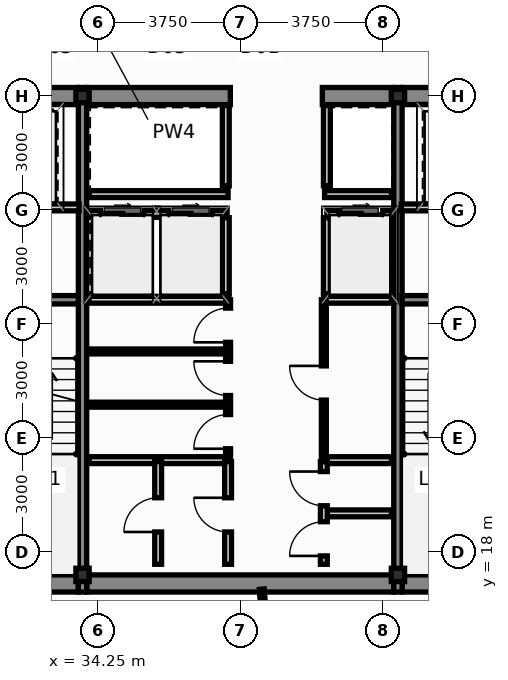
"""IFC4 building model, lengths in metres.
Left out: names, types, materials, properties, quantities, classifications, styles, units other than length and angle.
Written with IfcOpenShell. Run it as: python <this file> out.ifc"""

import sys

from ifc_helpers import new_model, si_unit, direction, frame, frame_2d, origin, origin_2d, place, context, subcontext, project, spatial, rectangle, hollow_rectangle, extrude, source, transform, mapped, element, fill, save


model = new_model("IFC4")
c1 = context("Model", 3, precision=1e-05, world=origin(), true_north=direction((0.0, 1.0)))
c2 = subcontext(c1, "Body", "Model", "MODEL_VIEW")
j1 = project(units=[si_unit("LENGTHUNIT", "METRE"), si_unit("PLANEANGLEUNIT", "RADIAN")], contexts=[c1])
p1 = place(None, origin())
s1 = spatial("IfcSite", under=j1, at=p1, CompositionType="ELEMENT")
p2 = place(p1, origin())
s2 = spatial("IfcBuilding", under=s1, at=p2, CompositionType="ELEMENT")
p3 = place(p2, frame((0.0, 0.0, 209.6)))
s3 = spatial("IfcBuildingStorey", under=s2, at=p3, CompositionType="ELEMENT", Elevation=209.6)
m1 = source(origin(), c2, "Body", "SweptSolid", [
    extrude(hollow_rectangle(XDim=0.35, YDim=0.35, WallThickness=0.016, at=origin_2d()), origin(), (0.0, 0.0, 1.0), 3.65),
])
for number, where, z_axis, x_axis in (
    (1, (33.85, 17.4, 0.0), (0.0, 0.0, 1.0), (1.0, 0.0, 0.0)),
    (2, (42.15, 17.4, 0.0), (0.0, 0.0, 1.0), (1.0, 0.0, 0.0)),
    (3, (33.85, 30.0, 0.0), (0.0, 0.0, 1.0), (1.0, 0.0, 0.0)),
    (4, (42.15, 30.0, 0.0), (0.0, 0.0, 1.0), (1.0, 0.0, 0.0)),
):
    element("IfcColumn", number, at=place(p3, frame(where, z_axis=z_axis, x_axis=x_axis)), inside=s3, PredefinedType="COLUMN", context=c2, shape_type="MappedRepresentation", body=[
        mapped(m1, transform((0.0, 0.0, 0.0), scale=1.0)),
    ])
p4 = place(p3, frame((30.84, 17.175, 0.0), z_axis=(0.0, 0.0, 1.0), x_axis=(1.0, 0.0, 0.0)))
e5 = element("IfcWall", 5, at=p4, inside=s3, PredefinedType="SHEAR", context=c2, shape_type="SweptSolid", body=[
    extrude(rectangle(XDim=2.9, YDim=0.45, at=frame_2d((1.45, 0.0))), origin(), (0.0, 0.0, 1.0), 3.65),
])
p5 = place(p3, frame((33.96, 17.175, 0.0), z_axis=(0.0, 0.0, 1.0), x_axis=(1.0, 0.0, 0.0)))
e6 = element("IfcWall", 6, at=p5, inside=s3, PredefinedType="SHEAR", context=c2, shape_type="SweptSolid", body=[
    extrude(rectangle(XDim=8.08, YDim=0.45, at=frame_2d((4.04, 0.0))), origin(), (0.0, 0.0, 1.0), 3.65),
])
for number, where, z_axis, x_axis in (
    (7, (42.26, 17.175, 0.0), (0.0, 0.0, 1.0), (1.0, 0.0, 0.0)),
    (8, (30.84, 30.0, 0.0), (0.0, 0.0, 1.0), (1.0, 0.0, 0.0)),
):
    element("IfcWall", number, at=place(p3, frame(where, z_axis=z_axis, x_axis=x_axis)), inside=s3, PredefinedType="SHEAR", context=c2, shape_type="SweptSolid", body=[
        extrude(rectangle(XDim=2.9, YDim=0.45, at=frame_2d((1.45, 0.0))), origin(), (0.0, 0.0, 1.0), 3.65),
    ])
p6 = place(p3, frame((33.96, 30.0, 0.0), z_axis=(0.0, 0.0, 1.0), x_axis=(1.0, 0.0, 0.0)))
e9 = element("IfcWall", 9, at=p6, inside=s3, PredefinedType="SHEAR", context=c2, shape_type="SweptSolid", body=[
    extrude(rectangle(XDim=3.78, YDim=0.45, at=frame_2d((1.89, 0.0))), origin(), (0.0, 0.0, 1.0), 3.65),
])
p7 = place(p3, frame((40.16, 30.0, 0.0), z_axis=(0.0, 0.0, 1.0), x_axis=(1.0, 0.0, 0.0)))
e10 = element("IfcWall", 10, at=p7, inside=s3, PredefinedType="SHEAR", context=c2, shape_type="SweptSolid", body=[
    extrude(rectangle(XDim=1.88, YDim=0.45, at=frame_2d((0.94, 0.0))), origin(), (0.0, 0.0, 1.0), 3.65),
])
p8 = place(p3, frame((42.26, 30.0, 0.0), z_axis=(0.0, 0.0, 1.0), x_axis=(1.0, 0.0, 0.0)))
e11 = element("IfcWall", 11, at=p8, inside=s3, PredefinedType="SHEAR", context=c2, shape_type="SweptSolid", body=[
    extrude(rectangle(XDim=2.9, YDim=0.45, at=frame_2d((1.45, 0.0))), origin(), (0.0, 0.0, 1.0), 3.65),
])
for number, where, z_axis, x_axis in (
    (12, (33.85, 16.95, 0.0), (0.0, 0.0, 1.0), (0.0, 1.0, 0.0)),
    (13, (42.15, 16.95, 0.0), (0.0, 0.0, 1.0), (0.0, 1.0, 0.0)),
):
    element("IfcWall", number, at=place(p3, frame(where, z_axis=z_axis, x_axis=x_axis)), inside=s3, PredefinedType="SHEAR", context=c2, shape_type="SweptSolid", body=[
        extrude(rectangle(XDim=13.275, YDim=0.22, at=frame_2d((6.638, 0.0))), origin(), (0.0, 0.0, 1.0), 3.65),
    ])
for number, where, z_axis, x_axis in (
    (14, (30.84, 24.64, 0.0), (0.0, 0.0, 1.0), (1.0, 0.0, 0.0)),
    (15, (42.26, 24.64, 0.0), (0.0, 0.0, 1.0), (1.0, 0.0, 0.0)),
):
    element("IfcWall", number, at=place(p3, frame(where, z_axis=z_axis, x_axis=x_axis)), inside=s3, PredefinedType="SHEAR", context=c2, shape_type="SweptSolid", body=[
        extrude(rectangle(XDim=2.9, YDim=0.22, at=frame_2d((1.45, 0.0))), origin(), (0.0, 0.0, 1.0), 3.65),
    ])
p9 = place(p3, frame((34.02, 26.9, 0.0), z_axis=(0.0, 0.0, 1.0), x_axis=(1.0, 0.0, 0.0)))
e16 = element("IfcWall", 16, at=p9, inside=s3, PredefinedType="PARTITIONING", context=c2, shape_type="SweptSolid", body=[
    extrude(rectangle(XDim=3.6, YDim=0.18, at=frame_2d((1.8, 0.0))), origin(), (0.0, 0.0, 1.0), 3.4),
])
p10 = place(p9, frame((0.3, 0.0, 0.0)))
e17 = element("IfcOpeningElement", 17, at=p10, cuts=e16, PredefinedType="OPENING", context=c2, shape_type="SweptSolid", body=[
    extrude(rectangle(XDim=1.15, YDim=2.2, at=frame_2d((0.575, 1.1))), frame((0.0, 0.102, 0.0), z_axis=(0.0, -1.0, 0.0), x_axis=(1.0, 0.0, 0.0)), (0.0, 0.0, 1.0), 0.204),
])
p11 = place(p9, frame((2.1, 0.0, 0.0)))
e18 = element("IfcOpeningElement", 18, at=p11, cuts=e16, PredefinedType="OPENING", context=c2, shape_type="SweptSolid", body=[
    extrude(rectangle(XDim=1.15, YDim=2.2, at=frame_2d((0.575, 1.1))), frame((0.0, 0.102, 0.0), z_axis=(0.0, -1.0, 0.0), x_axis=(1.0, 0.0, 0.0)), (0.0, 0.0, 1.0), 0.204),
])
p12 = place(p3, frame((40.28, 26.9, 0.0), z_axis=(0.0, 0.0, 1.0), x_axis=(1.0, 0.0, 0.0)))
e19 = element("IfcWall", 19, at=p12, inside=s3, PredefinedType="PARTITIONING", context=c2, shape_type="SweptSolid", body=[
    extrude(rectangle(XDim=1.7, YDim=0.18, at=frame_2d((0.85, 0.0))), origin(), (0.0, 0.0, 1.0), 3.4),
])
p13 = place(p12, frame((0.32, 0.0, 0.0)))
e20 = element("IfcOpeningElement", 20, at=p13, cuts=e19, PredefinedType="OPENING", context=c2, shape_type="SweptSolid", body=[
    extrude(rectangle(XDim=1.15, YDim=2.2, at=frame_2d((0.575, 1.1))), frame((0.0, 0.102, 0.0), z_axis=(0.0, -1.0, 0.0), x_axis=(1.0, 0.0, 0.0)), (0.0, 0.0, 1.0), 0.204),
])
for number, where, z_axis, x_axis in (
    (21, (37.62, 24.8, 0.0), (0.0, 0.0, 1.0), (0.0, 1.0, 0.0)),
    (22, (40.28, 24.8, 0.0), (0.0, 0.0, 1.0), (0.0, 1.0, 0.0)),
):
    element("IfcWall", number, at=place(p3, frame(where, z_axis=z_axis, x_axis=x_axis)), inside=s3, PredefinedType="PARTITIONING", context=c2, shape_type="SweptSolid", body=[
        extrude(rectangle(XDim=2.0, YDim=0.18, at=frame_2d((1.0, 0.0))), origin(), (0.0, 0.0, 1.0), 3.4),
    ])
p14 = place(p3, frame((34.02, 24.64, 0.0), z_axis=(0.0, 0.0, 1.0), x_axis=(1.0, 0.0, 0.0)))
e23 = element("IfcWall", 23, at=p14, inside=s3, PredefinedType="PARTITIONING", context=c2, shape_type="SweptSolid", body=[
    extrude(rectangle(XDim=3.68, YDim=0.18, at=frame_2d((1.84, 0.0))), origin(), (0.0, 0.0, 1.0), 3.4),
])
p15 = place(p3, frame((40.2, 24.64, 0.0), z_axis=(0.0, 0.0, 1.0), x_axis=(1.0, 0.0, 0.0)))
e24 = element("IfcWall", 24, at=p15, inside=s3, PredefinedType="PARTITIONING", context=c2, shape_type="SweptSolid", body=[
    extrude(rectangle(XDim=1.78, YDim=0.18, at=frame_2d((0.89, 0.0))), origin(), (0.0, 0.0, 1.0), 3.4),
])
p16 = place(p3, frame((34.02, 27.42, 0.0), z_axis=(0.0, 0.0, 1.0), x_axis=(1.0, 0.0, 0.0)))
e25 = element("IfcWall", 25, at=p16, inside=s3, PredefinedType="PARTITIONING", context=c2, shape_type="SweptSolid", body=[
    extrude(rectangle(XDim=3.66, YDim=0.18, at=frame_2d((1.83, 0.0))), origin(), (0.0, 0.0, 1.0), 3.4),
])
p17 = place(p3, frame((40.22, 27.42, 0.0), z_axis=(0.0, 0.0, 1.0), x_axis=(1.0, 0.0, 0.0)))
e26 = element("IfcWall", 26, at=p17, inside=s3, PredefinedType="PARTITIONING", context=c2, shape_type="SweptSolid", body=[
    extrude(rectangle(XDim=1.76, YDim=0.18, at=frame_2d((0.88, 0.0))), origin(), (0.0, 0.0, 1.0), 3.4),
])
for number, where, z_axis, x_axis in (
    (27, (37.62, 27.64, 0.0), (0.0, 0.0, 1.0), (0.0, 1.0, 0.0)),
    (28, (40.28, 27.64, 0.0), (0.0, 0.0, 1.0), (0.0, 1.0, 0.0)),
):
    element("IfcWall", number, at=place(p3, frame(where, z_axis=z_axis, x_axis=x_axis)), inside=s3, PredefinedType="PARTITIONING", context=c2, shape_type="SweptSolid", body=[
        extrude(rectangle(XDim=2.11, YDim=0.18, at=frame_2d((1.055, 0.0))), origin(), (0.0, 0.0, 1.0), 3.4),
    ])
for number, where, z_axis, x_axis in (
    (29, (30.86, 27.07, 0.0), (0.0, 0.0, 1.0), (1.0, 0.0, 0.0)),
    (30, (42.24, 27.07, 0.0), (0.0, 0.0, 1.0), (1.0, 0.0, 0.0)),
):
    element("IfcWall", number, at=place(p3, frame(where, z_axis=z_axis, x_axis=x_axis)), inside=s3, PredefinedType="PARTITIONING", context=c2, shape_type="SweptSolid", body=[
        extrude(rectangle(XDim=2.9, YDim=0.18, at=frame_2d((1.45, 0.0))), origin(), (0.0, 0.0, 1.0), 3.4),
    ])
p18 = place(p3, frame((34.02, 20.42, 0.0), z_axis=(0.0, 0.0, 1.0), x_axis=(1.0, 0.0, 0.0)))
e31 = element("IfcWall", 31, at=p18, inside=s3, PredefinedType="PARTITIONING", context=c2, shape_type="SweptSolid", body=[
    extrude(rectangle(XDim=3.64, YDim=0.18, at=frame_2d((1.82, 0.0))), origin(), (0.0, 0.0, 1.0), 3.4),
])
p19 = place(p3, frame((40.22, 20.42, 0.0), z_axis=(0.0, 0.0, 1.0), x_axis=(1.0, 0.0, 0.0)))
e32 = element("IfcWall", 32, at=p19, inside=s3, PredefinedType="PARTITIONING", context=c2, shape_type="SweptSolid", body=[
    extrude(rectangle(XDim=1.76, YDim=0.18, at=frame_2d((0.88, 0.0))), origin(), (0.0, 0.0, 1.0), 3.4),
])
for number, where, z_axis, x_axis in (
    (33, (34.02, 21.88, 0.0), (0.0, 0.0, 1.0), (1.0, 0.0, 0.0)),
    (34, (34.02, 23.28, 0.0), (0.0, 0.0, 1.0), (1.0, 0.0, 0.0)),
):
    element("IfcWall", number, at=place(p3, frame(where, z_axis=z_axis, x_axis=x_axis)), inside=s3, PredefinedType="PARTITIONING", context=c2, shape_type="SweptSolid", body=[
        extrude(rectangle(XDim=3.58, YDim=0.13, at=frame_2d((1.79, 0.0))), origin(), (0.0, 0.0, 1.0), 3.4),
    ])
p20 = place(p3, frame((37.68, 20.5, 0.0), z_axis=(0.0, 0.0, 1.0), x_axis=(0.0, 1.0, 0.0)))
e35 = element("IfcWall", 35, at=p20, inside=s3, PredefinedType="PARTITIONING", context=c2, shape_type="SweptSolid", body=[
    extrude(rectangle(XDim=4.14, YDim=0.13, at=frame_2d((2.07, 0.0))), origin(), (0.0, 0.0, 1.0), 3.4),
])
p21 = place(p20, frame((0.22, 0.0, 0.0)))
e36 = element("IfcOpeningElement", 36, at=p21, cuts=e35, PredefinedType="OPENING", context=c2, shape_type="SweptSolid", body=[
    extrude(rectangle(XDim=0.9, YDim=2.1, at=frame_2d((0.45, 1.05))), frame((0.0, 0.077, 0.0), z_axis=(0.0, -1.0, 0.0), x_axis=(1.0, 0.0, 0.0)), (0.0, 0.0, 1.0), 0.154),
])
p22 = place(p20, frame((1.62, 0.0, 0.0)))
e37 = element("IfcOpeningElement", 37, at=p22, cuts=e35, PredefinedType="OPENING", context=c2, shape_type="SweptSolid", body=[
    extrude(rectangle(XDim=0.9, YDim=2.1, at=frame_2d((0.45, 1.05))), frame((0.0, 0.077, 0.0), z_axis=(0.0, -1.0, 0.0), x_axis=(1.0, 0.0, 0.0)), (0.0, 0.0, 1.0), 0.154),
])
p23 = place(p20, frame((3.02, 0.0, 0.0)))
e38 = element("IfcOpeningElement", 38, at=p23, cuts=e35, PredefinedType="OPENING", context=c2, shape_type="SweptSolid", body=[
    extrude(rectangle(XDim=0.9, YDim=2.1, at=frame_2d((0.45, 1.05))), frame((0.0, 0.077, 0.0), z_axis=(0.0, -1.0, 0.0), x_axis=(1.0, 0.0, 0.0)), (0.0, 0.0, 1.0), 0.154),
])
p24 = place(p3, frame((40.2, 20.5, 0.0), z_axis=(0.0, 0.0, 1.0), x_axis=(0.0, 1.0, 0.0)))
e39 = element("IfcWall", 39, at=p24, inside=s3, PredefinedType="PARTITIONING", context=c2, shape_type="SweptSolid", body=[
    extrude(rectangle(XDim=4.14, YDim=0.13, at=frame_2d((2.07, 0.0))), origin(), (0.0, 0.0, 1.0), 3.4),
])
p25 = place(p24, frame((1.5, 0.0, 0.0)))
e40 = element("IfcOpeningElement", 40, at=p25, cuts=e39, PredefinedType="OPENING", context=c2, shape_type="SweptSolid", body=[
    extrude(rectangle(XDim=0.9, YDim=2.1, at=frame_2d((0.45, 1.05))), frame((0.0, 0.077, 0.0), z_axis=(0.0, -1.0, 0.0), x_axis=(1.0, 0.0, 0.0)), (0.0, 0.0, 1.0), 0.154),
])
p26 = place(p3, frame((35.84, 17.68, 0.0), z_axis=(0.0, 0.0, 1.0), x_axis=(0.0, 1.0, 0.0)))
e41 = element("IfcWall", 41, at=p26, inside=s3, PredefinedType="PARTITIONING", context=c2, shape_type="SweptSolid", body=[
    extrude(rectangle(XDim=2.7, YDim=0.18, at=frame_2d((1.35, 0.0))), origin(), (0.0, 0.0, 1.0), 3.4),
])
p27 = place(p26, frame((0.85, 0.0, 0.0)))
e42 = element("IfcOpeningElement", 42, at=p27, cuts=e41, PredefinedType="OPENING", context=c2, shape_type="SweptSolid", body=[
    extrude(rectangle(XDim=0.9, YDim=2.1, at=frame_2d((0.45, 1.05))), frame((0.0, 0.102, 0.0), z_axis=(0.0, -1.0, 0.0), x_axis=(1.0, 0.0, 0.0)), (0.0, 0.0, 1.0), 0.204),
])
p28 = place(p3, frame((37.68, 17.68, 0.0), z_axis=(0.0, 0.0, 1.0), x_axis=(0.0, 1.0, 0.0)))
e43 = element("IfcWall", 43, at=p28, inside=s3, PredefinedType="PARTITIONING", context=c2, shape_type="SweptSolid", body=[
    extrude(rectangle(XDim=2.7, YDim=0.18, at=frame_2d((1.35, 0.0))), origin(), (0.0, 0.0, 1.0), 3.4),
])
p29 = place(p28, frame((0.85, 0.0, 0.0)))
e44 = element("IfcOpeningElement", 44, at=p29, cuts=e43, PredefinedType="OPENING", context=c2, shape_type="SweptSolid", body=[
    extrude(rectangle(XDim=0.9, YDim=2.1, at=frame_2d((0.45, 1.05))), frame((0.0, 0.102, 0.0), z_axis=(0.0, -1.0, 0.0), x_axis=(1.0, 0.0, 0.0)), (0.0, 0.0, 1.0), 0.204),
])
p30 = place(p3, frame((40.28, 19.02, 0.0), z_axis=(0.0, 0.0, 1.0), x_axis=(1.0, 0.0, 0.0)))
e45 = element("IfcWall", 45, at=p30, inside=s3, PredefinedType="PARTITIONING", context=c2, shape_type="SweptSolid", body=[
    extrude(rectangle(XDim=1.7, YDim=0.18, at=frame_2d((0.85, 0.0))), origin(), (0.0, 0.0, 1.0), 3.4),
])
p31 = place(p3, frame((40.2, 17.68, 0.0), z_axis=(0.0, 0.0, 1.0), x_axis=(0.0, 1.0, 0.0)))
e46 = element("IfcWall", 46, at=p31, inside=s3, PredefinedType="PARTITIONING", context=c2, shape_type="SweptSolid", body=[
    extrude(rectangle(XDim=2.7, YDim=0.18, at=frame_2d((1.35, 0.0))), origin(), (0.0, 0.0, 1.0), 3.4),
])
p32 = place(p31, frame((0.22, 0.0, 0.0)))
e47 = element("IfcOpeningElement", 47, at=p32, cuts=e46, PredefinedType="OPENING", context=c2, shape_type="SweptSolid", body=[
    extrude(rectangle(XDim=0.9, YDim=2.1, at=frame_2d((0.45, 1.05))), frame((0.0, 0.102, 0.0), z_axis=(0.0, -1.0, 0.0), x_axis=(1.0, 0.0, 0.0)), (0.0, 0.0, 1.0), 0.204),
])
p33 = place(p31, frame((1.54, 0.0, 0.0)))
e48 = element("IfcOpeningElement", 48, at=p33, cuts=e46, PredefinedType="OPENING", context=c2, shape_type="SweptSolid", body=[
    extrude(rectangle(XDim=0.9, YDim=2.1, at=frame_2d((0.45, 1.05))), frame((0.0, 0.102, 0.0), z_axis=(0.0, -1.0, 0.0), x_axis=(1.0, 0.0, 0.0)), (0.0, 0.0, 1.0), 0.204),
])
p34 = place(p3, frame((38.566, 17.025, 0.0), z_axis=(0.0, 0.0, 1.0), x_axis=(0.079833930884, -0.996808177876, 0.0)))
e49 = element("IfcWall", 49, at=p34, inside=s3, PredefinedType="PARTITIONING", context=c2, shape_type="SweptSolid", body=[
    extrude(rectangle(XDim=5.688, YDim=0.13, at=frame_2d((2.844, 0.0))), origin(), (0.0, 0.0, 1.0), 3.4),
])
p35 = place(p10, origin())
e50 = element("IfcDoor", 50, at=p35, inside=s3, OperationType="SLIDING_TO_LEFT", PredefinedType="DOOR", context=c2, shape_type="SweptSolid", body=[
    extrude(rectangle(XDim=1.15, YDim=2.2, at=frame_2d((0.575, 1.1))), frame((0.0, 0.025, 0.0), z_axis=(0.0, -1.0, 0.0), x_axis=(1.0, 0.0, 0.0)), (0.0, 0.0, 1.0), 0.05),
])
fill(e17, e50)
p36 = place(p11, origin())
e51 = element("IfcDoor", 51, at=p36, inside=s3, OperationType="SLIDING_TO_RIGHT", PredefinedType="DOOR", context=c2, shape_type="SweptSolid", body=[
    extrude(rectangle(XDim=1.15, YDim=2.2, at=frame_2d((0.575, 1.1))), frame((0.0, 0.025, 0.0), z_axis=(0.0, -1.0, 0.0), x_axis=(1.0, 0.0, 0.0)), (0.0, 0.0, 1.0), 0.05),
])
fill(e18, e51)
p37 = place(p13, origin())
e52 = element("IfcDoor", 52, at=p37, inside=s3, OperationType="SLIDING_TO_LEFT", PredefinedType="DOOR", context=c2, shape_type="SweptSolid", body=[
    extrude(rectangle(XDim=1.15, YDim=2.2, at=frame_2d((0.575, 1.1))), frame((0.0, 0.025, 0.0), z_axis=(0.0, -1.0, 0.0), x_axis=(1.0, 0.0, 0.0)), (0.0, 0.0, 1.0), 0.05),
])
fill(e20, e52)
p38 = place(p21, origin())
e53 = element("IfcDoor", 53, at=p38, inside=s3, OperationType="SINGLE_SWING_LEFT", PredefinedType="DOOR", context=c2, shape_type="SweptSolid", body=[
    extrude(rectangle(XDim=0.9, YDim=2.1, at=frame_2d((0.45, 1.05))), frame((0.0, 0.025, 0.0), z_axis=(0.0, -1.0, 0.0), x_axis=(1.0, 0.0, 0.0)), (0.0, 0.0, 1.0), 0.05),
])
fill(e36, e53)
p39 = place(p22, origin())
e54 = element("IfcDoor", 54, at=p39, inside=s3, OperationType="SINGLE_SWING_RIGHT", PredefinedType="DOOR", context=c2, shape_type="SweptSolid", body=[
    extrude(rectangle(XDim=0.9, YDim=2.1, at=frame_2d((0.45, 1.05))), frame((0.0, 0.025, 0.0), z_axis=(0.0, -1.0, 0.0), x_axis=(1.0, 0.0, 0.0)), (0.0, 0.0, 1.0), 0.05),
])
fill(e37, e54)
p40 = place(p23, origin())
e55 = element("IfcDoor", 55, at=p40, inside=s3, OperationType="SINGLE_SWING_LEFT", PredefinedType="DOOR", context=c2, shape_type="SweptSolid", body=[
    extrude(rectangle(XDim=0.9, YDim=2.1, at=frame_2d((0.45, 1.05))), frame((0.0, 0.025, 0.0), z_axis=(0.0, -1.0, 0.0), x_axis=(1.0, 0.0, 0.0)), (0.0, 0.0, 1.0), 0.05),
])
fill(e38, e55)
p41 = place(p25, origin())
e56 = element("IfcDoor", 56, at=p41, inside=s3, OperationType="SINGLE_SWING_RIGHT", PredefinedType="DOOR", context=c2, shape_type="SweptSolid", body=[
    extrude(rectangle(XDim=0.9, YDim=2.1, at=frame_2d((0.45, 1.05))), frame((0.0, 0.025, 0.0), z_axis=(0.0, -1.0, 0.0), x_axis=(1.0, 0.0, 0.0)), (0.0, 0.0, 1.0), 0.05),
])
fill(e40, e56)
p42 = place(p27, origin())
e57 = element("IfcDoor", 57, at=p42, inside=s3, OperationType="SINGLE_SWING_LEFT", PredefinedType="DOOR", context=c2, shape_type="SweptSolid", body=[
    extrude(rectangle(XDim=0.9, YDim=2.1, at=frame_2d((0.45, 1.05))), frame((0.0, 0.025, 0.0), z_axis=(0.0, -1.0, 0.0), x_axis=(1.0, 0.0, 0.0)), (0.0, 0.0, 1.0), 0.05),
])
fill(e42, e57)
p43 = place(p29, origin())
e58 = element("IfcDoor", 58, at=p43, inside=s3, OperationType="SINGLE_SWING_RIGHT", PredefinedType="DOOR", context=c2, shape_type="SweptSolid", body=[
    extrude(rectangle(XDim=0.9, YDim=2.1, at=frame_2d((0.45, 1.05))), frame((0.0, 0.025, 0.0), z_axis=(0.0, -1.0, 0.0), x_axis=(1.0, 0.0, 0.0)), (0.0, 0.0, 1.0), 0.05),
])
fill(e44, e58)
p44 = place(p32, origin())
e59 = element("IfcDoor", 59, at=p44, inside=s3, OperationType="SINGLE_SWING_LEFT", PredefinedType="DOOR", context=c2, shape_type="SweptSolid", body=[
    extrude(rectangle(XDim=0.9, YDim=2.1, at=frame_2d((0.45, 1.05))), frame((0.0, 0.025, 0.0), z_axis=(0.0, -1.0, 0.0), x_axis=(1.0, 0.0, 0.0)), (0.0, 0.0, 1.0), 0.05),
])
fill(e47, e59)
p45 = place(p33, origin())
e60 = element("IfcDoor", 60, at=p45, inside=s3, OperationType="SINGLE_SWING_RIGHT", PredefinedType="DOOR", context=c2, shape_type="SweptSolid", body=[
    extrude(rectangle(XDim=0.9, YDim=2.1, at=frame_2d((0.45, 1.05))), frame((0.0, 0.025, 0.0), z_axis=(0.0, -1.0, 0.0), x_axis=(1.0, 0.0, 0.0)), (0.0, 0.0, 1.0), 0.05),
])
fill(e48, e60)
save(model, sys.argv[1])
